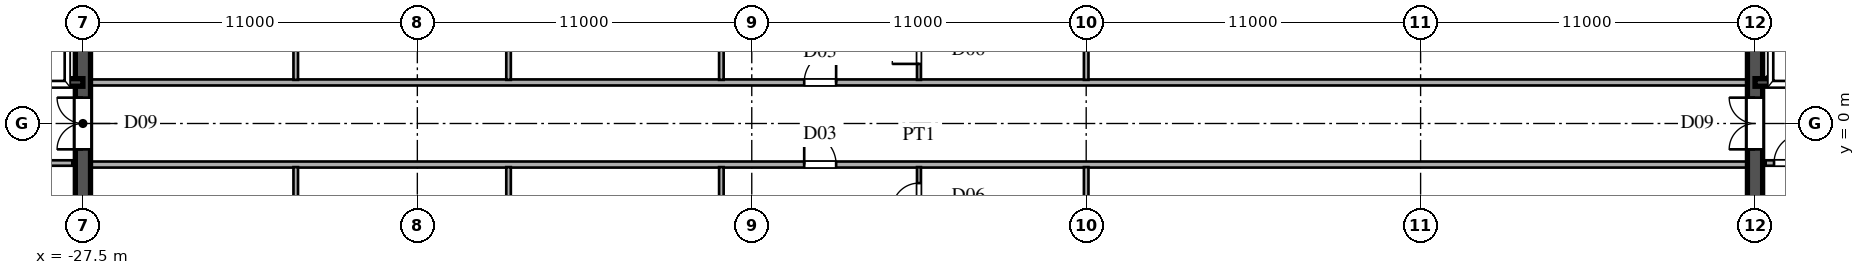
"""IFC4 building model, lengths in metres.
Left out: names, types, materials, properties, quantities, classifications, styles, units other than length and angle.
Written with IfcOpenShell. Run it as: python <this file> out.ifc"""

import sys

from ifc_helpers import new_model, si_unit, direction, frame, frame_2d, origin, place, context, subcontext, project, spatial, rectangle, extrude, source, transform, mapped, element, fill, save


model = new_model("IFC4")
c1 = context("Model", 3, precision=1e-05, world=origin(), true_north=direction((0.0, 1.0)))
c2 = subcontext(c1, "Body", "Model", "MODEL_VIEW")
j1 = project(units=[si_unit("LENGTHUNIT", "METRE"), si_unit("PLANEANGLEUNIT", "RADIAN")], contexts=[c1])
p1 = place(None, origin())
s1 = spatial("IfcSite", under=j1, at=p1, CompositionType="ELEMENT")
p2 = place(p1, origin())
s2 = spatial("IfcBuilding", under=s1, at=p2, CompositionType="ELEMENT")
p3 = place(p2, frame((0.0, 0.0, 239.4)))
s3 = spatial("IfcBuildingStorey", under=s2, at=p3, CompositionType="ELEMENT", Elevation=239.4)
for number, where, z_axis, x_axis in (
    (1, (-27.5, -13.5, 0.0), (0.0, 0.0, 1.0), (0.0, 1.0, 0.0)),
    (2, (-27.5, 1.3, 0.0), (0.0, 0.0, 1.0), (0.0, 1.0, 0.0)),
):
    element("IfcWall", number, at=place(p3, frame(where, z_axis=z_axis, x_axis=x_axis)), inside=s3, PredefinedType="SHEAR", context=c2, shape_type="SweptSolid", body=[
        extrude(rectangle(XDim=12.2, YDim=0.5, at=frame_2d((6.1, 0.0))), origin(), (0.0, 0.0, 1.0), 3.53),
    ])
p4 = place(p3, frame((-27.5, -1.3, 0.0), z_axis=(0.0, 0.0, 1.0), x_axis=(0.0, 1.0, 0.0)))
e3 = element("IfcWall", 3, at=p4, inside=s3, PredefinedType="SHEAR", context=c2, shape_type="SweptSolid", body=[
    extrude(rectangle(XDim=2.6, YDim=0.5, at=frame_2d((1.3, 0.0))), origin(), (0.0, 0.0, 1.0), 3.53),
])
p5 = place(p4, frame((0.45, 0.0, 0.0)))
e4 = element("IfcOpeningElement", 4, at=p5, cuts=e3, PredefinedType="OPENING", context=c2, shape_type="SweptSolid", body=[
    extrude(rectangle(XDim=1.7, YDim=2.35, at=frame_2d((0.85, 1.175))), frame((0.0, 0.26, 0.0), z_axis=(0.0, -1.0, 0.0), x_axis=(1.0, 0.0, 0.0)), (0.0, 0.0, 1.0), 0.52),
])
p6 = place(p3, frame((-30.3, 1.35, 0.0), z_axis=(0.0, 0.0, 1.0), x_axis=(1.0, 0.0, 0.0)))
e5 = element("IfcWall", 5, at=p6, inside=s3, PredefinedType="SHEAR", context=c2, shape_type="SweptSolid", body=[
    extrude(rectangle(XDim=2.8, YDim=0.25, at=frame_2d((1.4, 0.0))), origin(), (0.0, 0.0, 1.0), 3.53),
])
p7 = place(p3, frame((-30.3, -1.3, 0.0), z_axis=(0.0, 0.0, 1.0), x_axis=(1.0, 0.0, 0.0)))
e6 = element("IfcWall", 6, at=p7, inside=s3, PredefinedType="PARTITIONING", context=c2, shape_type="SweptSolid", body=[
    extrude(rectangle(XDim=2.45, YDim=0.18, at=frame_2d((1.225, 0.0))), origin(), (0.0, 0.0, 1.0), 3.53),
])
p8 = place(p7, frame((0.275, 0.0, 0.0)))
e7 = element("IfcOpeningElement", 7, at=p8, cuts=e6, PredefinedType="OPENING", context=c2, shape_type="SweptSolid", body=[
    extrude(rectangle(XDim=0.95, YDim=2.15, at=frame_2d((0.475, 1.075))), frame((0.0, 0.1, 0.0), z_axis=(0.0, -1.0, 0.0), x_axis=(1.0, 0.0, 0.0)), (0.0, 0.0, 1.0), 0.2),
])
for number, where, z_axis, x_axis in (
    (8, (27.5, -13.5, 0.0), (0.0, 0.0, 1.0), (0.0, 1.0, 0.0)),
    (9, (27.5, 1.3, 0.0), (0.0, 0.0, 1.0), (0.0, 1.0, 0.0)),
):
    element("IfcWall", number, at=place(p3, frame(where, z_axis=z_axis, x_axis=x_axis)), inside=s3, PredefinedType="SHEAR", context=c2, shape_type="SweptSolid", body=[
        extrude(rectangle(XDim=12.2, YDim=0.5, at=frame_2d((6.1, 0.0))), origin(), (0.0, 0.0, 1.0), 3.53),
    ])
p9 = place(p3, frame((27.5, -1.3, 0.0), z_axis=(0.0, 0.0, 1.0), x_axis=(0.0, 1.0, 0.0)))
e10 = element("IfcWall", 10, at=p9, inside=s3, PredefinedType="SHEAR", context=c2, shape_type="SweptSolid", body=[
    extrude(rectangle(XDim=2.6, YDim=0.5, at=frame_2d((1.3, 0.0))), origin(), (0.0, 0.0, 1.0), 3.53),
])
p10 = place(p9, frame((0.45, 0.0, 0.0)))
e11 = element("IfcOpeningElement", 11, at=p10, cuts=e10, PredefinedType="OPENING", context=c2, shape_type="SweptSolid", body=[
    extrude(rectangle(XDim=1.7, YDim=2.35, at=frame_2d((0.85, 1.175))), frame((0.0, 0.26, 0.0), z_axis=(0.0, -1.0, 0.0), x_axis=(1.0, 0.0, 0.0)), (0.0, 0.0, 1.0), 0.52),
])
p11 = place(p3, frame((27.5, 1.35, 0.0), z_axis=(0.0, 0.0, 1.0), x_axis=(1.0, 0.0, 0.0)))
e12 = element("IfcWall", 12, at=p11, inside=s3, PredefinedType="SHEAR", context=c2, shape_type="SweptSolid", body=[
    extrude(rectangle(XDim=2.8, YDim=0.25, at=frame_2d((1.4, 0.0))), origin(), (0.0, 0.0, 1.0), 3.53),
])
p12 = place(p3, frame((27.85, -1.3, 0.0), z_axis=(0.0, 0.0, 1.0), x_axis=(1.0, 0.0, 0.0)))
e13 = element("IfcWall", 13, at=p12, inside=s3, PredefinedType="PARTITIONING", context=c2, shape_type="SweptSolid", body=[
    extrude(rectangle(XDim=2.45, YDim=0.18, at=frame_2d((1.225, 0.0))), origin(), (0.0, 0.0, 1.0), 3.53),
])
p13 = place(p12, frame((0.275, 0.0, 0.0)))
e14 = element("IfcOpeningElement", 14, at=p13, cuts=e13, PredefinedType="OPENING", context=c2, shape_type="SweptSolid", body=[
    extrude(rectangle(XDim=0.95, YDim=2.15, at=frame_2d((0.475, 1.075))), frame((0.0, 0.1, 0.0), z_axis=(0.0, -1.0, 0.0), x_axis=(1.0, 0.0, 0.0)), (0.0, 0.0, 1.0), 0.2),
])
p14 = place(p3, frame((-27.245, -1.35, 0.0), z_axis=(0.0, 0.0, 1.0), x_axis=(1.0, 0.0, 0.0)))
e15 = element("IfcWall", 15, at=p14, inside=s3, PredefinedType="PARTITIONING", context=c2, shape_type="SweptSolid", body=[
    extrude(rectangle(XDim=54.49, YDim=0.2, at=frame_2d((27.245, 0.0))), origin(), (0.0, 0.0, 1.0), 3.53),
])
p15 = place(p14, frame((23.47, 0.0, 0.0)))
e16 = element("IfcOpeningElement", 16, at=p15, cuts=e15, PredefinedType="OPENING", context=c2, shape_type="SweptSolid", body=[
    extrude(rectangle(XDim=1.05, YDim=2.25, at=frame_2d((0.525, 1.125))), frame((0.0, 0.11, 0.0), z_axis=(0.0, -1.0, 0.0), x_axis=(1.0, 0.0, 0.0)), (0.0, 0.0, 1.0), 0.22),
])
p16 = place(p3, frame((-27.245, 1.35, 0.0), z_axis=(0.0, 0.0, 1.0), x_axis=(1.0, 0.0, 0.0)))
e17 = element("IfcWall", 17, at=p16, inside=s3, PredefinedType="PARTITIONING", context=c2, shape_type="SweptSolid", body=[
    extrude(rectangle(XDim=54.49, YDim=0.2, at=frame_2d((27.245, 0.0))), origin(), (0.0, 0.0, 1.0), 3.53),
])
p17 = place(p16, frame((23.47, 0.0, 0.0)))
e18 = element("IfcOpeningElement", 18, at=p17, cuts=e17, PredefinedType="OPENING", context=c2, shape_type="SweptSolid", body=[
    extrude(rectangle(XDim=1.05, YDim=2.25, at=frame_2d((0.525, 1.125))), frame((0.0, 0.11, 0.0), z_axis=(0.0, -1.0, 0.0), x_axis=(1.0, 0.0, 0.0)), (0.0, 0.0, 1.0), 0.22),
])
p18 = place(p3, frame((-20.5, -13.5, 0.0), z_axis=(0.0, 0.0, 1.0), x_axis=(0.0, 1.0, 0.0)))
e19 = element("IfcWall", 19, at=p18, inside=s3, PredefinedType="PARTITIONING", context=c2, shape_type="SweptSolid", body=[
    extrude(rectangle(XDim=12.065, YDim=0.15, at=frame_2d((6.032, 0.0))), origin(), (0.0, 0.0, 1.0), 3.53),
])
p19 = place(p18, frame((8.637, 0.0, 0.0)))
e20 = element("IfcOpeningElement", 20, at=p19, cuts=e19, PredefinedType="OPENING", context=c2, shape_type="SweptSolid", body=[
    extrude(rectangle(XDim=0.95, YDim=2.15, at=frame_2d((0.475, 1.075))), frame((0.0, 0.085, 0.0), z_axis=(0.0, -1.0, 0.0), x_axis=(1.0, 0.0, 0.0)), (0.0, 0.0, 1.0), 0.17),
])
p20 = place(p3, frame((-20.5, 1.435, 0.0), z_axis=(0.0, 0.0, 1.0), x_axis=(0.0, 1.0, 0.0)))
e21 = element("IfcWall", 21, at=p20, inside=s3, PredefinedType="PARTITIONING", context=c2, shape_type="SweptSolid", body=[
    extrude(rectangle(XDim=12.065, YDim=0.15, at=frame_2d((6.032, 0.0))), origin(), (0.0, 0.0, 1.0), 3.53),
])
p21 = place(p20, frame((2.478, 0.0, 0.0)))
e22 = element("IfcOpeningElement", 22, at=p21, cuts=e21, PredefinedType="OPENING", context=c2, shape_type="SweptSolid", body=[
    extrude(rectangle(XDim=0.95, YDim=2.15, at=frame_2d((0.475, 1.075))), frame((0.0, 0.085, 0.0), z_axis=(0.0, -1.0, 0.0), x_axis=(1.0, 0.0, 0.0)), (0.0, 0.0, 1.0), 0.17),
])
for number, where, z_axis, x_axis in (
    (23, (-13.5, -7.34, 0.0), (0.0, 0.0, 1.0), (0.0, 1.0, 0.0)),
    (24, (-13.5, 1.435, 0.0), (0.0, 0.0, 1.0), (0.0, 1.0, 0.0)),
):
    element("IfcWall", number, at=place(p3, frame(where, z_axis=z_axis, x_axis=x_axis)), inside=s3, PredefinedType="PARTITIONING", context=c2, shape_type="SweptSolid", body=[
        extrude(rectangle(XDim=5.905, YDim=0.15, at=frame_2d((2.953, 0.0))), origin(), (0.0, 0.0, 1.0), 3.53),
    ])
p22 = place(p3, frame((-6.5, -13.5, 0.0), z_axis=(0.0, 0.0, 1.0), x_axis=(0.0, 1.0, 0.0)))
e25 = element("IfcWall", 25, at=p22, inside=s3, PredefinedType="PARTITIONING", context=c2, shape_type="SweptSolid", body=[
    extrude(rectangle(XDim=12.065, YDim=0.15, at=frame_2d((6.032, 0.0))), origin(), (0.0, 0.0, 1.0), 3.53),
])
p23 = place(p22, frame((8.637, 0.0, 0.0)))
e26 = element("IfcOpeningElement", 26, at=p23, cuts=e25, PredefinedType="OPENING", context=c2, shape_type="SweptSolid", body=[
    extrude(rectangle(XDim=0.95, YDim=2.15, at=frame_2d((0.475, 1.075))), frame((0.0, 0.085, 0.0), z_axis=(0.0, -1.0, 0.0), x_axis=(1.0, 0.0, 0.0)), (0.0, 0.0, 1.0), 0.17),
])
p24 = place(p22, frame((2.562, 0.0, 0.0)))
e27 = element("IfcOpeningElement", 27, at=p24, cuts=e25, PredefinedType="OPENING", context=c2, shape_type="SweptSolid", body=[
    extrude(rectangle(XDim=0.95, YDim=2.15, at=frame_2d((0.475, 1.075))), frame((0.0, 0.085, 0.0), z_axis=(0.0, -1.0, 0.0), x_axis=(1.0, 0.0, 0.0)), (0.0, 0.0, 1.0), 0.17),
])
p25 = place(p3, frame((-6.5, 1.435, 0.0), z_axis=(0.0, 0.0, 1.0), x_axis=(0.0, 1.0, 0.0)))
e28 = element("IfcWall", 28, at=p25, inside=s3, PredefinedType="PARTITIONING", context=c2, shape_type="SweptSolid", body=[
    extrude(rectangle(XDim=12.065, YDim=0.15, at=frame_2d((6.032, 0.0))), origin(), (0.0, 0.0, 1.0), 3.53),
])
p26 = place(p25, frame((2.478, 0.0, 0.0)))
e29 = element("IfcOpeningElement", 29, at=p26, cuts=e28, PredefinedType="OPENING", context=c2, shape_type="SweptSolid", body=[
    extrude(rectangle(XDim=0.95, YDim=2.15, at=frame_2d((0.475, 1.075))), frame((0.0, 0.085, 0.0), z_axis=(0.0, -1.0, 0.0), x_axis=(1.0, 0.0, 0.0)), (0.0, 0.0, 1.0), 0.17),
])
p27 = place(p25, frame((8.552, 0.0, 0.0)))
e30 = element("IfcOpeningElement", 30, at=p27, cuts=e28, PredefinedType="OPENING", context=c2, shape_type="SweptSolid", body=[
    extrude(rectangle(XDim=0.95, YDim=2.15, at=frame_2d((0.475, 1.075))), frame((0.0, 0.085, 0.0), z_axis=(0.0, -1.0, 0.0), x_axis=(1.0, 0.0, 0.0)), (0.0, 0.0, 1.0), 0.17),
])
p28 = place(p3, frame((0.0, -13.39, 0.0), z_axis=(0.0, 0.0, 1.0), x_axis=(0.0, 1.0, 0.0)))
e31 = element("IfcWall", 31, at=p28, inside=s3, PredefinedType="PARTITIONING", context=c2, shape_type="SweptSolid", body=[
    extrude(rectangle(XDim=11.955, YDim=0.13, at=frame_2d((5.978, 0.0))), origin(), (0.0, 0.0, 1.0), 2.43),
])
p29 = place(p28, frame((10.55, 0.0, 0.0)))
e32 = element("IfcOpeningElement", 32, at=p29, cuts=e31, PredefinedType="OPENING", context=c2, shape_type="SweptSolid", body=[
    extrude(rectangle(XDim=0.88, YDim=2.1, at=frame_2d((0.44, 1.05))), frame((0.0, 0.075, 0.0), z_axis=(0.0, -1.0, 0.0), x_axis=(1.0, 0.0, 0.0)), (0.0, 0.0, 1.0), 0.15),
])
p30 = place(p28, frame((4.44, 0.0, 0.0)))
e33 = element("IfcOpeningElement", 33, at=p30, cuts=e31, PredefinedType="OPENING", context=c2, shape_type="SweptSolid", body=[
    extrude(rectangle(XDim=0.95, YDim=2.15, at=frame_2d((0.475, 1.075))), frame((0.0, 0.075, 0.0), z_axis=(0.0, -1.0, 0.0), x_axis=(1.0, 0.0, 0.0)), (0.0, 0.0, 1.0), 0.15),
])
p31 = place(p3, frame((0.0, 1.435, 0.0), z_axis=(0.0, 0.0, 1.0), x_axis=(0.0, 1.0, 0.0)))
e34 = element("IfcWall", 34, at=p31, inside=s3, PredefinedType="PARTITIONING", context=c2, shape_type="SweptSolid", body=[
    extrude(rectangle(XDim=11.955, YDim=0.13, at=frame_2d((5.978, 0.0))), origin(), (0.0, 0.0, 1.0), 2.43),
])
p32 = place(p31, frame((0.525, 0.0, 0.0)))
e35 = element("IfcOpeningElement", 35, at=p32, cuts=e34, PredefinedType="OPENING", context=c2, shape_type="SweptSolid", body=[
    extrude(rectangle(XDim=0.88, YDim=2.1, at=frame_2d((0.44, 1.05))), frame((0.0, 0.075, 0.0), z_axis=(0.0, -1.0, 0.0), x_axis=(1.0, 0.0, 0.0)), (0.0, 0.0, 1.0), 0.15),
])
p33 = place(p31, frame((6.565, 0.0, 0.0)))
e36 = element("IfcOpeningElement", 36, at=p33, cuts=e34, PredefinedType="OPENING", context=c2, shape_type="SweptSolid", body=[
    extrude(rectangle(XDim=0.95, YDim=2.15, at=frame_2d((0.475, 1.075))), frame((0.0, 0.075, 0.0), z_axis=(0.0, -1.0, 0.0), x_axis=(1.0, 0.0, 0.0)), (0.0, 0.0, 1.0), 0.15),
])
p34 = place(p3, frame((5.5, -13.39, 0.0), z_axis=(0.0, 0.0, 1.0), x_axis=(0.0, 1.0, 0.0)))
e37 = element("IfcWall", 37, at=p34, inside=s3, PredefinedType="PARTITIONING", context=c2, shape_type="SweptSolid", body=[
    extrude(rectangle(XDim=11.955, YDim=0.15, at=frame_2d((5.978, 0.0))), origin(), (0.0, 0.0, 1.0), 2.43),
])
p35 = place(p34, frame((7.478, 0.0, 0.0)))
e38 = element("IfcOpeningElement", 38, at=p35, cuts=e37, PredefinedType="OPENING", context=c2, shape_type="SweptSolid", body=[
    extrude(rectangle(XDim=0.95, YDim=2.15, at=frame_2d((0.475, 1.075))), frame((0.0, 0.085, 0.0), z_axis=(0.0, -1.0, 0.0), x_axis=(1.0, 0.0, 0.0)), (0.0, 0.0, 1.0), 0.17),
])
p36 = place(p3, frame((5.5, 1.435, 0.0), z_axis=(0.0, 0.0, 1.0), x_axis=(0.0, 1.0, 0.0)))
e39 = element("IfcWall", 39, at=p36, inside=s3, PredefinedType="PARTITIONING", context=c2, shape_type="SweptSolid", body=[
    extrude(rectangle(XDim=11.955, YDim=0.15, at=frame_2d((5.978, 0.0))), origin(), (0.0, 0.0, 1.0), 2.43),
])
p37 = place(p36, frame((3.528, 0.0, 0.0)))
e40 = element("IfcOpeningElement", 40, at=p37, cuts=e39, PredefinedType="OPENING", context=c2, shape_type="SweptSolid", body=[
    extrude(rectangle(XDim=0.95, YDim=2.15, at=frame_2d((0.475, 1.075))), frame((0.0, 0.085, 0.0), z_axis=(0.0, -1.0, 0.0), x_axis=(1.0, 0.0, 0.0)), (0.0, 0.0, 1.0), 0.17),
])
m1 = source(origin(), c2, "Body", "SweptSolid", [
    extrude(rectangle(XDim=1.7, YDim=2.35, at=frame_2d((0.85, 1.175))), frame((0.0, 0.025, 0.0), z_axis=(0.0, -1.0, 0.0), x_axis=(1.0, 0.0, 0.0)), (0.0, 0.0, 1.0), 0.05),
])
p38 = place(p5, origin())
e41 = element("IfcDoor", 41, at=p38, inside=s3, OperationType="DOUBLE_SWING_LEFT", PredefinedType="DOOR", context=c2, shape_type="MappedRepresentation", body=[
    mapped(m1, transform((0.0, 0.0, 0.0), scale=1.0)),
])
fill(e4, e41)
p39 = place(p10, origin())
e42 = element("IfcDoor", 42, at=p39, inside=s3, OperationType="DOUBLE_SWING_LEFT", PredefinedType="DOOR", context=c2, shape_type="MappedRepresentation", body=[
    mapped(m1, transform((0.0, 0.0, 0.0), scale=1.0)),
])
fill(e11, e42)
m2 = source(origin(), c2, "Body", "SweptSolid", [
    extrude(rectangle(XDim=0.95, YDim=2.15, at=frame_2d((0.475, 1.075))), frame((0.0, 0.025, 0.0), z_axis=(0.0, -1.0, 0.0), x_axis=(1.0, 0.0, 0.0)), (0.0, 0.0, 1.0), 0.05),
])
p40 = place(p13, origin())
e43 = element("IfcDoor", 43, at=p40, inside=s3, OperationType="SINGLE_SWING_RIGHT", PredefinedType="DOOR", context=c2, shape_type="MappedRepresentation", body=[
    mapped(m2, transform((0.0, 0.0, 0.0), scale=1.0)),
])
fill(e14, e43)
m3 = source(origin(), c2, "Body", "SweptSolid", [
    extrude(rectangle(XDim=1.05, YDim=2.25, at=frame_2d((0.525, 1.125))), frame((0.0, 0.025, 0.0), z_axis=(0.0, -1.0, 0.0), x_axis=(1.0, 0.0, 0.0)), (0.0, 0.0, 1.0), 0.05),
])
p41 = place(p15, origin())
e44 = element("IfcDoor", 44, at=p41, inside=s3, OperationType="SINGLE_SWING_LEFT", PredefinedType="DOOR", context=c2, shape_type="MappedRepresentation", body=[
    mapped(m3, transform((0.0, 0.0, 0.0), scale=1.0)),
])
fill(e16, e44)
p42 = place(p17, origin())
e45 = element("IfcDoor", 45, at=p42, inside=s3, OperationType="SINGLE_SWING_RIGHT", PredefinedType="DOOR", context=c2, shape_type="MappedRepresentation", body=[
    mapped(m3, transform((0.0, 0.0, 0.0), scale=1.0)),
])
fill(e18, e45)
m4 = source(origin(), c2, "Body", "SweptSolid", [
    extrude(rectangle(XDim=0.88, YDim=2.1, at=frame_2d((0.44, 1.05))), frame((0.0, 0.025, 0.0), z_axis=(0.0, -1.0, 0.0), x_axis=(1.0, 0.0, 0.0)), (0.0, 0.0, 1.0), 0.05),
])
p43 = place(p29, origin())
e46 = element("IfcDoor", 46, at=p43, inside=s3, OperationType="SINGLE_SWING_LEFT", PredefinedType="DOOR", context=c2, shape_type="MappedRepresentation", body=[
    mapped(m4, transform((0.0, 0.0, 0.0), scale=1.0)),
])
fill(e32, e46)
p44 = place(p32, origin())
e47 = element("IfcDoor", 47, at=p44, inside=s3, OperationType="SINGLE_SWING_LEFT", PredefinedType="DOOR", context=c2, shape_type="MappedRepresentation", body=[
    mapped(m4, transform((0.0, 0.0, 0.0), scale=1.0)),
])
fill(e35, e47)
save(model, sys.argv[1])
